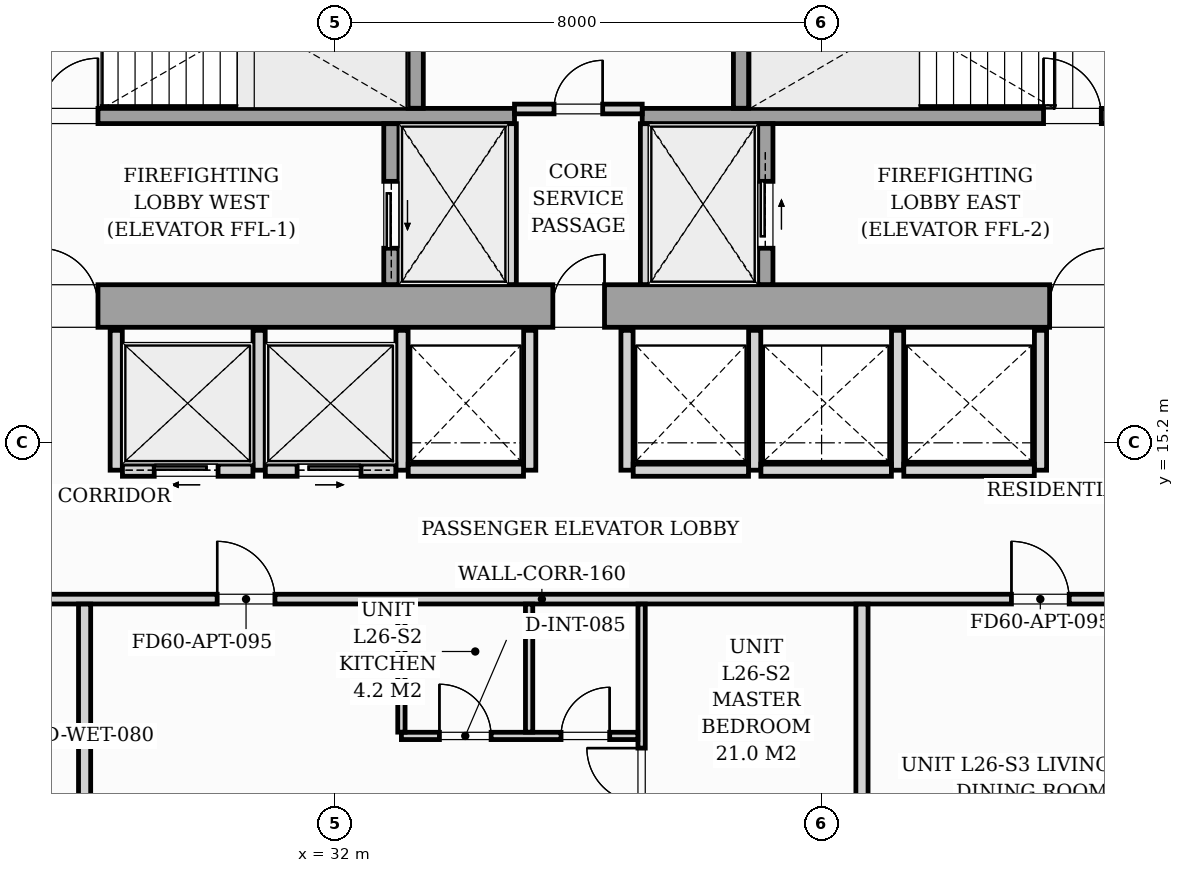
"""IFC4 building model, lengths in metres.
Left out: names, types, materials, properties, quantities, classifications, styles, units other than length and angle.
Written with IfcOpenShell. Run it as: python <this file> out.ifc"""

import sys

from ifc_helpers import new_model, si_unit, direction, frame, frame_2d, origin, origin_2d, place, context, subcontext, project, spatial, rectangle, i_section, extrude, source, transform, mapped, element, fill, save


model = new_model("IFC4")
c1 = context("Model", 3, precision=1e-05, world=origin(), true_north=direction((0.0, 1.0)))
c2 = subcontext(c1, "Body", "Model", "MODEL_VIEW")
j1 = project(units=[si_unit("LENGTHUNIT", "METRE"), si_unit("PLANEANGLEUNIT", "RADIAN")], contexts=[c1])
p1 = place(None, origin())
s1 = spatial("IfcSite", under=j1, at=p1, CompositionType="ELEMENT")
p2 = place(p1, origin())
s2 = spatial("IfcBuilding", under=s1, at=p2, CompositionType="ELEMENT")
p3 = place(p2, frame((0.0, 0.0, 93.8)))
s3 = spatial("IfcBuildingStorey", under=s2, at=p3, CompositionType="ELEMENT", Elevation=93.8)
m1 = source(origin(), c2, "Body", "SweptSolid", [
    extrude(i_section(OverallWidth=0.427, OverallDepth=0.483, WebThickness=0.051, FlangeThickness=0.082, FilletRadius=0.018, at=origin_2d()), origin(), (0.0, 0.0, 1.0), 3.196),
])
for number, where, z_axis, x_axis in (
    (1, (33.12, 17.4, 0.002), (0.0, 0.0, 1.0), (1.0, 0.0, 0.0)),
    (2, (38.88, 17.4, 0.002), (0.0, 0.0, 1.0), (1.0, 0.0, 0.0)),
):
    element("IfcColumn", number, at=place(p3, frame(where, z_axis=z_axis, x_axis=x_axis)), inside=s3, PredefinedType="PILASTER", context=c2, shape_type="MappedRepresentation", body=[
        mapped(m1, transform((0.0, 0.0, 0.0), scale=1.0)),
    ])
p4 = place(p3, frame((26.1, 17.45, 0.0), z_axis=(0.0, 0.0, 1.0), x_axis=(1.0, 0.0, 0.0)))
e3 = element("IfcWall", 3, at=p4, inside=s3, PredefinedType="SHEAR", context=c2, shape_type="SweptSolid", body=[
    extrude(rectangle(XDim=19.8, YDim=0.7, at=frame_2d((9.9, 0.0))), origin(), (0.0, 0.0, 1.0), 3.2),
])
p5 = place(p4, frame((1.05, 0.0, 0.0)))
e4 = element("IfcOpeningElement", 4, at=p5, cuts=e3, PredefinedType="OPENING", context=c2, shape_type="SweptSolid", body=[
    extrude(rectangle(XDim=0.95, YDim=2.06, at=frame_2d((0.475, 1.03))), frame((0.0, 0.36, 0.0), z_axis=(0.0, -1.0, 0.0), x_axis=(1.0, 0.0, 0.0)), (0.0, 0.0, 1.0), 0.72),
])
p6 = place(p4, frame((9.48, 0.0, 0.0)))
e5 = element("IfcOpeningElement", 5, at=p6, cuts=e3, PredefinedType="OPENING", context=c2, shape_type="SweptSolid", body=[
    extrude(rectangle(XDim=0.85, YDim=2.0, at=frame_2d((0.425, 1.0))), frame((0.0, 0.36, 0.0), z_axis=(0.0, -1.0, 0.0), x_axis=(1.0, 0.0, 0.0)), (0.0, 0.0, 1.0), 0.72),
])
p7 = place(p4, frame((17.65, 0.0, 0.0)))
e6 = element("IfcOpeningElement", 6, at=p7, cuts=e3, PredefinedType="OPENING", context=c2, shape_type="SweptSolid", body=[
    extrude(rectangle(XDim=0.95, YDim=2.06, at=frame_2d((0.475, 1.03))), frame((0.0, 0.36, 0.0), z_axis=(0.0, -1.0, 0.0), x_axis=(1.0, 0.0, 0.0)), (0.0, 0.0, 1.0), 0.72),
])
p8 = place(p3, frame((26.802, 20.575, 0.0), z_axis=(0.0, 0.0, 1.0), x_axis=(1.0, 0.0, 0.0)))
e7 = element("IfcWall", 7, at=p8, inside=s3, PredefinedType="SOLIDWALL", context=c2, shape_type="SweptSolid", body=[
    extrude(rectangle(XDim=8.148, YDim=0.25, at=frame_2d((4.074, 0.0))), origin(), (0.0, 0.0, 1.0), 3.2),
])
p9 = place(p8, frame((0.348, 0.0, 0.0)))
e8 = element("IfcOpeningElement", 8, at=p9, cuts=e7, PredefinedType="OPENING", context=c2, shape_type="SweptSolid", body=[
    extrude(rectangle(XDim=0.95, YDim=2.06, at=frame_2d((0.475, 1.03))), frame((0.0, 0.135, 0.0), z_axis=(0.0, -1.0, 0.0), x_axis=(1.0, 0.0, 0.0)), (0.0, 0.0, 1.0), 0.27),
])
p10 = place(p3, frame((37.05, 20.575, 0.0), z_axis=(0.0, 0.0, 1.0), x_axis=(1.0, 0.0, 0.0)))
e9 = element("IfcWall", 9, at=p10, inside=s3, PredefinedType="SOLIDWALL", context=c2, shape_type="SweptSolid", body=[
    extrude(rectangle(XDim=8.148, YDim=0.25, at=frame_2d((4.074, 0.0))), origin(), (0.0, 0.0, 1.0), 3.2),
])
p11 = place(p10, frame((6.6, 0.0, 0.0)))
e10 = element("IfcOpeningElement", 10, at=p11, cuts=e9, PredefinedType="OPENING", context=c2, shape_type="SweptSolid", body=[
    extrude(rectangle(XDim=0.95, YDim=2.06, at=frame_2d((0.475, 1.03))), frame((0.0, 0.135, 0.0), z_axis=(0.0, -1.0, 0.0), x_axis=(1.0, 0.0, 0.0)), (0.0, 0.0, 1.0), 0.27),
])
for number, where, z_axis, x_axis in (
    (11, (33.325, 20.702, 0.0), (0.0, 0.0, 1.0), (0.0, 1.0, 0.0)),
    (12, (38.675, 20.702, 0.0), (0.0, 0.0, 1.0), (0.0, 1.0, 0.0)),
):
    element("IfcWall", number, at=place(p3, frame(where, z_axis=z_axis, x_axis=x_axis)), inside=s3, PredefinedType="SOLIDWALL", context=c2, shape_type="SweptSolid", body=[
        extrude(rectangle(XDim=2.896, YDim=0.25, at=frame_2d((1.448, 0.0))), origin(), (0.0, 0.0, 1.0), 3.2),
    ])
p12 = place(p3, frame((32.925, 17.802, 0.0), z_axis=(0.0, 0.0, 1.0), x_axis=(0.0, 1.0, 0.0)))
e13 = element("IfcWall", 13, at=p12, inside=s3, PredefinedType="SOLIDWALL", context=c2, shape_type="SweptSolid", body=[
    extrude(rectangle(XDim=2.646, YDim=0.25, at=frame_2d((1.323, 0.0))), origin(), (0.0, 0.0, 1.0), 3.2),
])
p13 = place(p12, frame((0.598, 0.0, 0.0)))
e14 = element("IfcOpeningElement", 14, at=p13, cuts=e13, PredefinedType="OPENING", context=c2, shape_type="SweptSolid", body=[
    extrude(rectangle(XDim=1.1, YDim=2.08, at=frame_2d((0.55, 1.04))), frame((0.0, 0.135, 0.0), z_axis=(0.0, -1.0, 0.0), x_axis=(1.0, 0.0, 0.0)), (0.0, 0.0, 1.0), 0.27),
])
for number, where, z_axis, x_axis in (
    (15, (34.9, 17.802, 0.0), (0.0, 0.0, 1.0), (0.0, 1.0, 0.0)),
    (16, (37.1, 17.802, 0.0), (0.0, 0.0, 1.0), (0.0, 1.0, 0.0)),
):
    element("IfcWall", number, at=place(p3, frame(where, z_axis=z_axis, x_axis=x_axis)), inside=s3, PredefinedType="PARTITIONING", context=c2, shape_type="SweptSolid", body=[
        extrude(rectangle(XDim=2.646, YDim=0.16, at=frame_2d((1.323, 0.0))), origin(), (0.0, 0.0, 1.0), 2.94),
    ])
p14 = place(p3, frame((39.075, 17.802, 0.0), z_axis=(0.0, 0.0, 1.0), x_axis=(0.0, 1.0, 0.0)))
e17 = element("IfcWall", 17, at=p14, inside=s3, PredefinedType="SOLIDWALL", context=c2, shape_type="SweptSolid", body=[
    extrude(rectangle(XDim=2.646, YDim=0.25, at=frame_2d((1.323, 0.0))), origin(), (0.0, 0.0, 1.0), 3.2),
])
p15 = place(p14, frame((0.598, 0.0, 0.0)))
e18 = element("IfcOpeningElement", 18, at=p15, cuts=e17, PredefinedType="OPENING", context=c2, shape_type="SweptSolid", body=[
    extrude(rectangle(XDim=1.1, YDim=2.08, at=frame_2d((0.55, 1.04))), frame((0.0, 0.135, 0.0), z_axis=(0.0, -1.0, 0.0), x_axis=(1.0, 0.0, 0.0)), (0.0, 0.0, 1.0), 0.27),
])
p16 = place(p3, frame((34.95, 20.69, 0.0), z_axis=(0.0, 0.0, 1.0), x_axis=(1.0, 0.0, 0.0)))
e19 = element("IfcWall", 19, at=p16, inside=s3, PredefinedType="PARTITIONING", context=c2, shape_type="SweptSolid", body=[
    extrude(rectangle(XDim=2.1, YDim=0.16, at=frame_2d((1.05, 0.0))), origin(), (0.0, 0.0, 1.0), 2.94),
])
p17 = place(p16, frame((0.65, 0.0, 0.0)))
e20 = element("IfcOpeningElement", 20, at=p17, cuts=e19, PredefinedType="OPENING", context=c2, shape_type="SweptSolid", body=[
    extrude(rectangle(XDim=0.8, YDim=2.05, at=frame_2d((0.4, 1.025))), frame((0.0, 0.09, 0.0), z_axis=(0.0, -1.0, 0.0), x_axis=(1.0, 0.0, 0.0)), (0.0, 0.0, 1.0), 0.18),
])
for number, where, z_axis, x_axis in (
    (21, (28.4, 14.75, 0.0), (0.0, 0.0, 1.0), (0.0, 1.0, 0.0)),
    (22, (30.75, 14.75, 0.0), (0.0, 0.0, 1.0), (0.0, 1.0, 0.0)),
    (23, (33.1, 14.75, 0.0), (0.0, 0.0, 1.0), (0.0, 1.0, 0.0)),
):
    element("IfcWall", number, at=place(p3, frame(where, z_axis=z_axis, x_axis=x_axis)), inside=s3, PredefinedType="PARTITIONING", context=c2, shape_type="SweptSolid", body=[
        extrude(rectangle(XDim=2.3, YDim=0.2, at=frame_2d((1.15, 0.0))), origin(), (0.0, 0.0, 1.0), 2.94),
    ])
p18 = place(p3, frame((28.502, 14.75, 0.0), z_axis=(0.0, 0.0, 1.0), x_axis=(1.0, 0.0, 0.0)))
e24 = element("IfcWall", 24, at=p18, inside=s3, PredefinedType="PARTITIONING", context=c2, shape_type="SweptSolid", body=[
    extrude(rectangle(XDim=2.146, YDim=0.2, at=frame_2d((1.073, 0.0))), origin(), (0.0, 0.0, 1.0), 2.94),
])
p19 = place(p18, frame((0.523, 0.0, 0.0)))
e25 = element("IfcOpeningElement", 25, at=p19, cuts=e24, PredefinedType="OPENING", context=c2, shape_type="SweptSolid", body=[
    extrude(rectangle(XDim=1.05, YDim=2.08, at=frame_2d((0.525, 1.04))), frame((0.0, 0.11, 0.0), z_axis=(0.0, -1.0, 0.0), x_axis=(1.0, 0.0, 0.0)), (0.0, 0.0, 1.0), 0.22),
])
p20 = place(p3, frame((30.852, 14.75, 0.0), z_axis=(0.0, 0.0, 1.0), x_axis=(1.0, 0.0, 0.0)))
e26 = element("IfcWall", 26, at=p20, inside=s3, PredefinedType="PARTITIONING", context=c2, shape_type="SweptSolid", body=[
    extrude(rectangle(XDim=2.146, YDim=0.2, at=frame_2d((1.073, 0.0))), origin(), (0.0, 0.0, 1.0), 2.94),
])
p21 = place(p20, frame((0.523, 0.0, 0.0)))
e27 = element("IfcOpeningElement", 27, at=p21, cuts=e26, PredefinedType="OPENING", context=c2, shape_type="SweptSolid", body=[
    extrude(rectangle(XDim=1.05, YDim=2.08, at=frame_2d((0.525, 1.04))), frame((0.0, 0.11, 0.0), z_axis=(0.0, -1.0, 0.0), x_axis=(1.0, 0.0, 0.0)), (0.0, 0.0, 1.0), 0.22),
])
p22 = place(p3, frame((35.2, 14.75, 0.0), z_axis=(0.0, 0.0, 1.0), x_axis=(0.0, 1.0, 0.0)))
e28 = element("IfcWall", 28, at=p22, inside=s3, PredefinedType="PARTITIONING", context=c2, shape_type="SweptSolid", body=[
    extrude(rectangle(XDim=2.3, YDim=0.2, at=frame_2d((1.15, 0.0))), origin(), (0.0, 0.0, 1.0), 2.94),
])
p23 = place(p3, frame((33.202, 14.75, 0.0), z_axis=(0.0, 0.0, 1.0), x_axis=(1.0, 0.0, 0.0)))
e29 = element("IfcWall", 29, at=p23, inside=s3, PredefinedType="PARTITIONING", context=c2, shape_type="SweptSolid", body=[
    extrude(rectangle(XDim=1.896, YDim=0.2, at=frame_2d((0.948, 0.0))), origin(), (0.0, 0.0, 1.0), 2.94),
])
for number, where, z_axis, x_axis in (
    (30, (36.8, 14.75, 0.0), (0.0, 0.0, 1.0), (0.0, 1.0, 0.0)),
    (31, (38.9, 14.75, 0.0), (0.0, 0.0, 1.0), (0.0, 1.0, 0.0)),
):
    element("IfcWall", number, at=place(p3, frame(where, z_axis=z_axis, x_axis=x_axis)), inside=s3, PredefinedType="PARTITIONING", context=c2, shape_type="SweptSolid", body=[
        extrude(rectangle(XDim=2.3, YDim=0.2, at=frame_2d((1.15, 0.0))), origin(), (0.0, 0.0, 1.0), 2.94),
    ])
p24 = place(p3, frame((36.902, 14.75, 0.0), z_axis=(0.0, 0.0, 1.0), x_axis=(1.0, 0.0, 0.0)))
e32 = element("IfcWall", 32, at=p24, inside=s3, PredefinedType="PARTITIONING", context=c2, shape_type="SweptSolid", body=[
    extrude(rectangle(XDim=1.896, YDim=0.2, at=frame_2d((0.948, 0.0))), origin(), (0.0, 0.0, 1.0), 2.94),
])
for number, where, z_axis, x_axis in (
    (33, (41.25, 14.75, 0.0), (0.0, 0.0, 1.0), (0.0, 1.0, 0.0)),
    (34, (43.6, 14.75, 0.0), (0.0, 0.0, 1.0), (0.0, 1.0, 0.0)),
):
    element("IfcWall", number, at=place(p3, frame(where, z_axis=z_axis, x_axis=x_axis)), inside=s3, PredefinedType="PARTITIONING", context=c2, shape_type="SweptSolid", body=[
        extrude(rectangle(XDim=2.3, YDim=0.2, at=frame_2d((1.15, 0.0))), origin(), (0.0, 0.0, 1.0), 2.94),
    ])
for number, where, z_axis, x_axis in (
    (35, (39.002, 14.75, 0.0), (0.0, 0.0, 1.0), (1.0, 0.0, 0.0)),
    (36, (41.352, 14.75, 0.0), (0.0, 0.0, 1.0), (1.0, 0.0, 0.0)),
):
    element("IfcWall", number, at=place(p3, frame(where, z_axis=z_axis, x_axis=x_axis)), inside=s3, PredefinedType="PARTITIONING", context=c2, shape_type="SweptSolid", body=[
        extrude(rectangle(XDim=2.146, YDim=0.2, at=frame_2d((1.073, 0.0))), origin(), (0.0, 0.0, 1.0), 2.94),
    ])
p25 = place(p3, frame((16.6, 12.63, 0.0), z_axis=(0.0, 0.0, 1.0), x_axis=(1.0, 0.0, 0.0)))
e37 = element("IfcWall", 37, at=p25, inside=s3, PredefinedType="PARTITIONING", context=c2, shape_type="SweptSolid", body=[
    extrude(rectangle(XDim=37.6, YDim=0.16, at=frame_2d((18.8, 0.0))), origin(), (0.0, 0.0, 1.0), 2.94),
])
p26 = place(p25, frame((1.626, 0.0, 0.0)))
e38 = element("IfcOpeningElement", 38, at=p26, cuts=e37, PredefinedType="OPENING", context=c2, shape_type="SweptSolid", body=[
    extrude(rectangle(XDim=0.95, YDim=2.06, at=frame_2d((0.475, 1.03))), frame((0.0, 0.09, 0.0), z_axis=(0.0, -1.0, 0.0), x_axis=(1.0, 0.0, 0.0)), (0.0, 0.0, 1.0), 0.18),
])
p27 = place(p25, frame((13.46, 0.0, 0.0)))
e39 = element("IfcOpeningElement", 39, at=p27, cuts=e37, PredefinedType="OPENING", context=c2, shape_type="SweptSolid", body=[
    extrude(rectangle(XDim=0.95, YDim=2.06, at=frame_2d((0.475, 1.03))), frame((0.0, 0.09, 0.0), z_axis=(0.0, -1.0, 0.0), x_axis=(1.0, 0.0, 0.0)), (0.0, 0.0, 1.0), 0.18),
])
p28 = place(p25, frame((26.522, 0.0, 0.0)))
e40 = element("IfcOpeningElement", 40, at=p28, cuts=e37, PredefinedType="OPENING", context=c2, shape_type="SweptSolid", body=[
    extrude(rectangle(XDim=0.95, YDim=2.06, at=frame_2d((0.475, 1.03))), frame((0.0, 0.09, 0.0), z_axis=(0.0, -1.0, 0.0), x_axis=(1.0, 0.0, 0.0)), (0.0, 0.0, 1.0), 0.18),
])
p29 = place(p3, frame((27.88, 5.427, 0.0), z_axis=(0.0, 0.0, 1.0), x_axis=(0.0, 1.0, 0.0)))
e41 = element("IfcWall", 41, at=p29, inside=s3, PredefinedType="PARTITIONING", context=c2, shape_type="SweptSolid", body=[
    extrude(rectangle(XDim=7.121, YDim=0.2, at=frame_2d((3.561, 0.0))), origin(), (0.0, 0.0, 1.0), 2.94),
])
p30 = place(p3, frame((37.04, 6.126, 0.0), z_axis=(0.0, 0.0, 1.0), x_axis=(0.0, 1.0, 0.0)))
e42 = element("IfcWall", 42, at=p30, inside=s3, PredefinedType="PARTITIONING", context=c2, shape_type="SweptSolid", body=[
    extrude(rectangle(XDim=6.422, YDim=0.12, at=frame_2d((3.211, 0.0))), origin(), (0.0, 0.0, 1.0), 2.94),
])
p31 = place(p30, frame((3.154, 0.0, 0.0)))
e43 = element("IfcOpeningElement", 43, at=p31, cuts=e42, PredefinedType="OPENING", context=c2, shape_type="SweptSolid", body=[
    extrude(rectangle(XDim=0.9, YDim=2.05, at=frame_2d((0.45, 1.025))), frame((0.0, 0.07, 0.0), z_axis=(0.0, -1.0, 0.0), x_axis=(1.0, 0.0, 0.0)), (0.0, 0.0, 1.0), 0.14),
])
p32 = place(p3, frame((33.09, 10.38, 0.0), z_axis=(0.0, 0.0, 1.0), x_axis=(1.0, 0.0, 0.0)))
e44 = element("IfcWall", 44, at=p32, inside=s3, PredefinedType="PARTITIONING", context=c2, shape_type="SweptSolid", body=[
    extrude(rectangle(XDim=3.888, YDim=0.12, at=frame_2d((1.944, 0.0))), origin(), (0.0, 0.0, 1.0), 2.94),
])
p33 = place(p32, frame((0.625, 0.0, 0.0)))
e45 = element("IfcOpeningElement", 45, at=p33, cuts=e44, PredefinedType="OPENING", context=c2, shape_type="SweptSolid", body=[
    extrude(rectangle(XDim=0.85, YDim=2.05, at=frame_2d((0.425, 1.025))), frame((0.0, 0.07, 0.0), z_axis=(0.0, -1.0, 0.0), x_axis=(1.0, 0.0, 0.0)), (0.0, 0.0, 1.0), 0.14),
])
p34 = place(p32, frame((2.625, 0.0, 0.0)))
e46 = element("IfcOpeningElement", 46, at=p34, cuts=e44, PredefinedType="OPENING", context=c2, shape_type="SweptSolid", body=[
    extrude(rectangle(XDim=0.8, YDim=2.02, at=frame_2d((0.4, 1.01))), frame((0.0, 0.07, 0.0), z_axis=(0.0, -1.0, 0.0), x_axis=(1.0, 0.0, 0.0)), (0.0, 0.0, 1.0), 0.14),
])
for number, where, z_axis, x_axis in (
    (47, (35.19, 10.442, 0.0), (0.0, 0.0, 1.0), (0.0, 1.0, 0.0)),
    (48, (33.09, 10.442, 0.0), (0.0, 0.0, 1.0), (0.0, 1.0, 0.0)),
):
    element("IfcWall", number, at=place(p3, frame(where, z_axis=z_axis, x_axis=x_axis)), inside=s3, PredefinedType="PARTITIONING", context=c2, shape_type="SweptSolid", body=[
        extrude(rectangle(XDim=2.106, YDim=0.12, at=frame_2d((1.053, 0.0))), origin(), (0.0, 0.0, 1.0), 2.94),
    ])
p35 = place(p3, frame((40.664, 6.475, 0.0), z_axis=(0.0, 0.0, 1.0), x_axis=(0.0, 1.0, 0.0)))
e49 = element("IfcWall", 49, at=p35, inside=s3, PredefinedType="PARTITIONING", context=c2, shape_type="SweptSolid", body=[
    extrude(rectangle(XDim=6.073, YDim=0.2, at=frame_2d((3.037, 0.0))), origin(), (0.0, 0.0, 1.0), 2.94),
])
m2 = source(origin(), c2, "Body", "SweptSolid", [
    extrude(rectangle(XDim=0.95, YDim=2.06, at=frame_2d((0.475, 1.03))), frame((0.0, 0.025, 0.0), z_axis=(0.0, -1.0, 0.0), x_axis=(1.0, 0.0, 0.0)), (0.0, 0.0, 1.0), 0.05),
])
p36 = place(p5, origin())
e50 = element("IfcDoor", 50, at=p36, inside=s3, OperationType="SINGLE_SWING_LEFT", PredefinedType="DOOR", context=c2, shape_type="MappedRepresentation", body=[
    mapped(m2, transform((0.0, 0.0, 0.0), scale=1.0)),
])
fill(e4, e50)
m3 = source(origin(), c2, "Body", "SweptSolid", [
    extrude(rectangle(XDim=0.85, YDim=2.0, at=frame_2d((0.425, 1.0))), frame((0.0, 0.025, 0.0), z_axis=(0.0, -1.0, 0.0), x_axis=(1.0, 0.0, 0.0)), (0.0, 0.0, 1.0), 0.05),
])
p37 = place(p6, origin())
e51 = element("IfcDoor", 51, at=p37, inside=s3, OperationType="SINGLE_SWING_RIGHT", PredefinedType="DOOR", context=c2, shape_type="MappedRepresentation", body=[
    mapped(m3, transform((0.0, 0.0, 0.0), scale=1.0)),
])
fill(e5, e51)
p38 = place(p7, origin())
e52 = element("IfcDoor", 52, at=p38, inside=s3, OperationType="SINGLE_SWING_RIGHT", PredefinedType="DOOR", context=c2, shape_type="MappedRepresentation", body=[
    mapped(m2, transform((0.0, 0.0, 0.0), scale=1.0)),
])
fill(e6, e52)
p39 = place(p9, origin())
e53 = element("IfcDoor", 53, at=p39, inside=s3, OperationType="SINGLE_SWING_RIGHT", PredefinedType="DOOR", context=c2, shape_type="MappedRepresentation", body=[
    mapped(m2, transform((0.0, 0.0, 0.0), scale=1.0)),
])
fill(e8, e53)
p40 = place(p11, origin())
e54 = element("IfcDoor", 54, at=p40, inside=s3, OperationType="SINGLE_SWING_LEFT", PredefinedType="DOOR", context=c2, shape_type="MappedRepresentation", body=[
    mapped(m2, transform((0.0, 0.0, 0.0), scale=1.0)),
])
fill(e10, e54)
m4 = source(origin(), c2, "Body", "SweptSolid", [
    extrude(rectangle(XDim=1.1, YDim=2.08, at=frame_2d((0.55, 1.04))), frame((0.0, 0.025, 0.0), z_axis=(0.0, -1.0, 0.0), x_axis=(1.0, 0.0, 0.0)), (0.0, 0.0, 1.0), 0.05),
])
p41 = place(p13, origin())
e55 = element("IfcDoor", 55, at=p41, inside=s3, OperationType="SLIDING_TO_LEFT", PredefinedType="DOOR", context=c2, shape_type="MappedRepresentation", body=[
    mapped(m4, transform((0.0, 0.0, 0.0), scale=1.0)),
])
fill(e14, e55)
p42 = place(p15, origin())
e56 = element("IfcDoor", 56, at=p42, inside=s3, OperationType="SLIDING_TO_RIGHT", PredefinedType="DOOR", context=c2, shape_type="MappedRepresentation", body=[
    mapped(m4, transform((0.0, 0.0, 0.0), scale=1.0)),
])
fill(e18, e56)
m5 = source(origin(), c2, "Body", "SweptSolid", [
    extrude(rectangle(XDim=0.8, YDim=2.05, at=frame_2d((0.4, 1.025))), frame((0.0, 0.025, 0.0), z_axis=(0.0, -1.0, 0.0), x_axis=(1.0, 0.0, 0.0)), (0.0, 0.0, 1.0), 0.05),
])
p43 = place(p17, origin())
e57 = element("IfcDoor", 57, at=p43, inside=s3, OperationType="SINGLE_SWING_RIGHT", PredefinedType="DOOR", context=c2, shape_type="MappedRepresentation", body=[
    mapped(m5, transform((0.0, 0.0, 0.0), scale=1.0)),
])
fill(e20, e57)
m6 = source(origin(), c2, "Body", "SweptSolid", [
    extrude(rectangle(XDim=1.05, YDim=2.08, at=frame_2d((0.525, 1.04))), frame((0.0, 0.025, 0.0), z_axis=(0.0, -1.0, 0.0), x_axis=(1.0, 0.0, 0.0)), (0.0, 0.0, 1.0), 0.05),
])
p44 = place(p19, origin())
e58 = element("IfcDoor", 58, at=p44, inside=s3, OperationType="SLIDING_TO_LEFT", PredefinedType="DOOR", context=c2, shape_type="MappedRepresentation", body=[
    mapped(m6, transform((0.0, 0.0, 0.0), scale=1.0)),
])
fill(e25, e58)
p45 = place(p21, origin())
e59 = element("IfcDoor", 59, at=p45, inside=s3, OperationType="SLIDING_TO_RIGHT", PredefinedType="DOOR", context=c2, shape_type="MappedRepresentation", body=[
    mapped(m6, transform((0.0, 0.0, 0.0), scale=1.0)),
])
fill(e27, e59)
m7 = source(origin(), c2, "Body", "SweptSolid", [
    extrude(rectangle(XDim=0.95, YDim=2.06, at=frame_2d((0.475, 1.03))), frame((0.0, 0.025, 0.0), z_axis=(0.0, -1.0, 0.0), x_axis=(1.0, 0.0, 0.0)), (0.0, 0.0, 1.0), 0.05),
])
p46 = place(p27, origin())
e60 = element("IfcDoor", 60, at=p46, inside=s3, OperationType="SINGLE_SWING_LEFT", PredefinedType="DOOR", context=c2, shape_type="MappedRepresentation", body=[
    mapped(m7, transform((0.0, 0.0, 0.0), scale=1.0)),
])
fill(e39, e60)
m8 = source(origin(), c2, "Body", "SweptSolid", [
    extrude(rectangle(XDim=0.9, YDim=2.05, at=frame_2d((0.45, 1.025))), frame((0.0, 0.025, 0.0), z_axis=(0.0, -1.0, 0.0), x_axis=(1.0, 0.0, 0.0)), (0.0, 0.0, 1.0), 0.05),
])
p47 = place(p31, origin())
e61 = element("IfcDoor", 61, at=p47, inside=s3, OperationType="SINGLE_SWING_RIGHT", PredefinedType="DOOR", context=c2, shape_type="MappedRepresentation", body=[
    mapped(m8, transform((0.0, 0.0, 0.0), scale=1.0)),
])
fill(e43, e61)
m9 = source(origin(), c2, "Body", "SweptSolid", [
    extrude(rectangle(XDim=0.85, YDim=2.05, at=frame_2d((0.425, 1.025))), frame((0.0, 0.025, 0.0), z_axis=(0.0, -1.0, 0.0), x_axis=(1.0, 0.0, 0.0)), (0.0, 0.0, 1.0), 0.05),
])
p48 = place(p33, origin())
e62 = element("IfcDoor", 62, at=p48, inside=s3, OperationType="SINGLE_SWING_LEFT", PredefinedType="DOOR", context=c2, shape_type="MappedRepresentation", body=[
    mapped(m9, transform((0.0, 0.0, 0.0), scale=1.0)),
])
fill(e45, e62)
m10 = source(origin(), c2, "Body", "SweptSolid", [
    extrude(rectangle(XDim=0.8, YDim=2.02, at=frame_2d((0.4, 1.01))), frame((0.0, 0.025, 0.0), z_axis=(0.0, -1.0, 0.0), x_axis=(1.0, 0.0, 0.0)), (0.0, 0.0, 1.0), 0.05),
])
p49 = place(p34, origin())
e63 = element("IfcDoor", 63, at=p49, inside=s3, OperationType="SINGLE_SWING_RIGHT", PredefinedType="DOOR", context=c2, shape_type="MappedRepresentation", body=[
    mapped(m10, transform((0.0, 0.0, 0.0), scale=1.0)),
])
fill(e46, e63)
p50 = place(p28, origin())
e64 = element("IfcDoor", 64, at=p50, inside=s3, OperationType="SINGLE_SWING_LEFT", PredefinedType="DOOR", context=c2, shape_type="MappedRepresentation", body=[
    mapped(m7, transform((0.0, 0.0, 0.0), scale=1.0)),
])
fill(e40, e64)
save(model, sys.argv[1])
